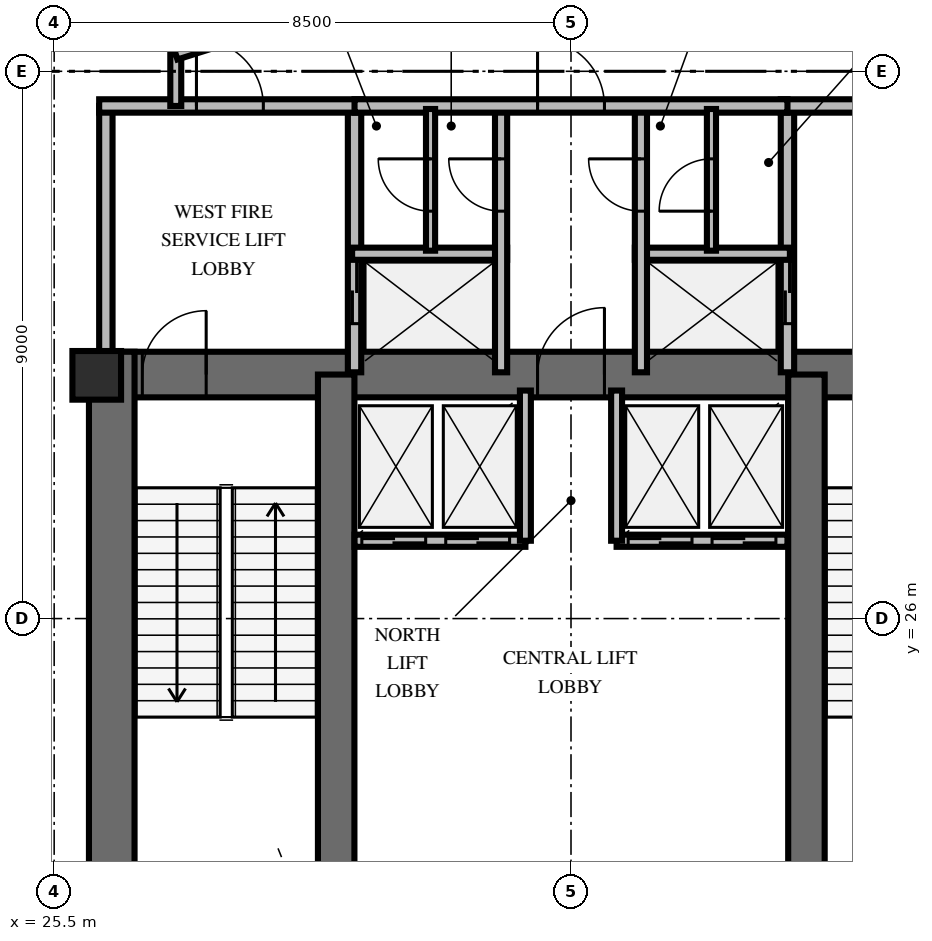
"""IFC4 building model, lengths in metres.
Left out: names, types, materials, properties, quantities, classifications, styles, units other than length and angle.
Written with IfcOpenShell. Run it as: python <this file> out.ifc"""

import sys

from ifc_helpers import new_model, si_unit, direction, frame, frame_2d, origin, origin_2d, place, context, subcontext, project, spatial, rectangle, extrude, element, fill, save


model = new_model("IFC4")
c1 = context("Model", 3, precision=1e-05, world=origin(), true_north=direction((0.0, 1.0)))
c2 = subcontext(c1, "Body", "Model", "MODEL_VIEW")
j1 = project(units=[si_unit("LENGTHUNIT", "METRE"), si_unit("PLANEANGLEUNIT", "RADIAN")], contexts=[c1])
p1 = place(None, origin())
s1 = spatial("IfcSite", under=j1, at=p1, CompositionType="ELEMENT")
p2 = place(p1, origin())
s2 = spatial("IfcBuilding", under=s1, at=p2, CompositionType="ELEMENT")
p3 = place(p2, frame((0.0, 0.0, 225.4)))
s3 = spatial("IfcBuildingStorey", under=s2, at=p3, CompositionType="ELEMENT", Elevation=225.4)
p4 = place(p3, frame((26.072, 30.013, 0.0), z_axis=(0.0, 0.0, 1.0), x_axis=(1.0, 0.0, 0.0)))
e1 = element("IfcWall", 1, at=p4, inside=s3, PredefinedType="SHEAR", context=c2, shape_type="SweptSolid", body=[
    extrude(rectangle(XDim=15.866, YDim=0.75, at=frame_2d((7.933, 0.0))), origin(), (0.0, 0.0, 1.0), 5.0),
])
p5 = place(p4, frame((0.878, 0.0, 0.0)))
e2 = element("IfcOpeningElement", 2, at=p5, cuts=e1, PredefinedType="OPENING", context=c2, shape_type="SweptSolid", body=[
    extrude(rectangle(XDim=1.05, YDim=2.15, at=frame_2d((0.525, 1.075))), frame((0.0, 0.385, 0.0), z_axis=(0.0, -1.0, 0.0), x_axis=(1.0, 0.0, 0.0)), (0.0, 0.0, 1.0), 0.77),
])
p6 = place(p4, frame((13.928, 0.0, 0.0)))
e3 = element("IfcOpeningElement", 3, at=p6, cuts=e1, PredefinedType="OPENING", context=c2, shape_type="SweptSolid", body=[
    extrude(rectangle(XDim=1.05, YDim=2.15, at=frame_2d((0.525, 1.075))), frame((0.0, 0.385, 0.0), z_axis=(0.0, -1.0, 0.0), x_axis=(1.0, 0.0, 0.0)), (0.0, 0.0, 1.0), 0.77),
])
p7 = place(p4, frame((7.378, 0.0, 0.0)))
e4 = element("IfcOpeningElement", 4, at=p7, cuts=e1, PredefinedType="OPENING", context=c2, shape_type="SweptSolid", body=[
    extrude(rectangle(XDim=1.1, YDim=2.15, at=frame_2d((0.55, 1.075))), frame((0.0, 0.385, 0.0), z_axis=(0.0, -1.0, 0.0), x_axis=(1.0, 0.0, 0.0)), (0.0, 0.0, 1.0), 0.77),
])
p8 = place(p3, frame((26.447, 19.812, 0.0), z_axis=(0.0, 0.0, 1.0), x_axis=(0.0, 1.0, 0.0)))
e5 = element("IfcWall", 5, at=p8, inside=s3, PredefinedType="SHEAR", context=c2, shape_type="SweptSolid", body=[
    extrude(rectangle(XDim=10.576, YDim=0.75, at=frame_2d((5.288, 0.0))), origin(), (0.0, 0.0, 1.0), 5.0),
])
for number, where, z_axis, x_axis in (
    (6, (30.138, 20.187, 0.0), (0.0, 0.0, 1.0), (0.0, 1.0, 0.0)),
    (7, (37.872, 20.187, 0.0), (0.0, 0.0, 1.0), (0.0, 1.0, 0.0)),
):
    element("IfcWall", number, at=place(p3, frame(where, z_axis=z_axis, x_axis=x_axis)), inside=s3, PredefinedType="SHEAR", context=c2, shape_type="SweptSolid", body=[
        extrude(rectangle(XDim=9.826, YDim=0.6, at=frame_2d((4.913, 0.0))), origin(), (0.0, 0.0, 1.0), 5.0),
    ])
p9 = place(p3, frame((26.2, 30.0, 0.0), z_axis=(0.0, 0.0, 1.0), x_axis=(1.0, 0.0, 0.0)))
e8 = element("IfcColumn", 8, at=p9, inside=s3, PredefinedType="PILASTER", context=c2, shape_type="SweptSolid", body=[
    extrude(rectangle(XDim=0.8, YDim=0.8, at=origin_2d()), origin(), (0.0, 0.0, 1.0), 5.0),
])
p10 = place(p3, frame((26.35, 30.05, 0.0), z_axis=(0.0, 0.0, 1.0), x_axis=(0.0, 1.0, 0.0)))
e9 = element("IfcWall", 9, at=p10, inside=s3, PredefinedType="SOLIDWALL", context=c2, shape_type="SweptSolid", body=[
    extrude(rectangle(XDim=4.38, YDim=0.22, at=frame_2d((2.19, 0.0))), origin(), (0.0, 0.0, 1.0), 2.9),
])
p11 = place(p3, frame((30.44, 30.05, 0.0), z_axis=(0.0, 0.0, 1.0), x_axis=(0.0, 1.0, 0.0)))
e10 = element("IfcWall", 10, at=p11, inside=s3, PredefinedType="SOLIDWALL", context=c2, shape_type="SweptSolid", body=[
    extrude(rectangle(XDim=4.38, YDim=0.22, at=frame_2d((2.19, 0.0))), origin(), (0.0, 0.0, 1.0), 2.9),
])
p12 = place(p11, frame((0.8, 0.0, 0.0)))
e11 = element("IfcOpeningElement", 11, at=p12, cuts=e10, PredefinedType="OPENING", context=c2, shape_type="SweptSolid", body=[
    extrude(rectangle(XDim=1.05, YDim=2.1, at=frame_2d((0.525, 1.05))), frame((0.0, 0.12, 0.0), z_axis=(0.0, -1.0, 0.0), x_axis=(1.0, 0.0, 0.0)), (0.0, 0.0, 1.0), 0.24),
])
p13 = place(p3, frame((26.24, 34.43, 0.0), z_axis=(0.0, 0.0, 1.0), x_axis=(1.0, 0.0, 0.0)))
e12 = element("IfcWall", 12, at=p13, inside=s3, PredefinedType="SOLIDWALL", context=c2, shape_type="SweptSolid", body=[
    extrude(rectangle(XDim=4.31, YDim=0.22, at=frame_2d((2.155, 0.0))), origin(), (0.0, 0.0, 1.0), 2.9),
])
p14 = place(p13, frame((1.6, 0.0, 0.0)))
e13 = element("IfcOpeningElement", 13, at=p14, cuts=e12, PredefinedType="OPENING", context=c2, shape_type="SweptSolid", body=[
    extrude(rectangle(XDim=1.1, YDim=2.15, at=frame_2d((0.55, 1.075))), frame((0.0, 0.12, 0.0), z_axis=(0.0, -1.0, 0.0), x_axis=(1.0, 0.0, 0.0)), (0.0, 0.0, 1.0), 0.24),
])
p15 = place(p3, frame((30.4, 32.0, 0.0), z_axis=(0.0, 0.0, 1.0), x_axis=(1.0, 0.0, 0.0)))
e14 = element("IfcWall", 14, at=p15, inside=s3, PredefinedType="SOLIDWALL", context=c2, shape_type="SweptSolid", body=[
    extrude(rectangle(XDim=2.55, YDim=0.2, at=frame_2d((1.275, 0.0))), origin(), (0.0, 0.0, 1.0), 2.9),
])
p16 = place(p3, frame((32.85, 30.05, 0.0), z_axis=(0.0, 0.0, 1.0), x_axis=(0.0, 1.0, 0.0)))
e15 = element("IfcWall", 15, at=p16, inside=s3, PredefinedType="SOLIDWALL", context=c2, shape_type="SweptSolid", body=[
    extrude(rectangle(XDim=4.38, YDim=0.2, at=frame_2d((2.19, 0.0))), origin(), (0.0, 0.0, 1.0), 2.9),
])
p17 = place(p16, frame((2.65, 0.0, 0.0)))
e16 = element("IfcOpeningElement", 16, at=p17, cuts=e15, PredefinedType="OPENING", context=c2, shape_type="SweptSolid", body=[
    extrude(rectangle(XDim=0.86, YDim=2.05, at=frame_2d((0.43, 1.025))), frame((0.0, 0.11, 0.0), z_axis=(0.0, -1.0, 0.0), x_axis=(1.0, 0.0, 0.0)), (0.0, 0.0, 1.0), 0.22),
])
p18 = place(p3, frame((37.56, 30.05, 0.0), z_axis=(0.0, 0.0, 1.0), x_axis=(0.0, 1.0, 0.0)))
e17 = element("IfcWall", 17, at=p18, inside=s3, PredefinedType="SOLIDWALL", context=c2, shape_type="SweptSolid", body=[
    extrude(rectangle(XDim=4.38, YDim=0.22, at=frame_2d((2.19, 0.0))), origin(), (0.0, 0.0, 1.0), 2.9),
])
p19 = place(p18, frame((0.8, 0.0, 0.0)))
e18 = element("IfcOpeningElement", 18, at=p19, cuts=e17, PredefinedType="OPENING", context=c2, shape_type="SweptSolid", body=[
    extrude(rectangle(XDim=1.05, YDim=2.1, at=frame_2d((0.525, 1.05))), frame((0.0, 0.12, 0.0), z_axis=(0.0, -1.0, 0.0), x_axis=(1.0, 0.0, 0.0)), (0.0, 0.0, 1.0), 0.24),
])
p20 = place(p3, frame((37.45, 34.43, 0.0), z_axis=(0.0, 0.0, 1.0), x_axis=(1.0, 0.0, 0.0)))
e19 = element("IfcWall", 19, at=p20, inside=s3, PredefinedType="SOLIDWALL", context=c2, shape_type="SweptSolid", body=[
    extrude(rectangle(XDim=4.31, YDim=0.22, at=frame_2d((2.155, 0.0))), origin(), (0.0, 0.0, 1.0), 2.9),
])
p21 = place(p20, frame((1.6, 0.0, 0.0)))
e20 = element("IfcOpeningElement", 20, at=p21, cuts=e19, PredefinedType="OPENING", context=c2, shape_type="SweptSolid", body=[
    extrude(rectangle(XDim=1.1, YDim=2.15, at=frame_2d((0.55, 1.075))), frame((0.0, 0.12, 0.0), z_axis=(0.0, -1.0, 0.0), x_axis=(1.0, 0.0, 0.0)), (0.0, 0.0, 1.0), 0.24),
])
p22 = place(p3, frame((35.05, 32.0, 0.0), z_axis=(0.0, 0.0, 1.0), x_axis=(1.0, 0.0, 0.0)))
e21 = element("IfcWall", 21, at=p22, inside=s3, PredefinedType="SOLIDWALL", context=c2, shape_type="SweptSolid", body=[
    extrude(rectangle(XDim=2.55, YDim=0.2, at=frame_2d((1.275, 0.0))), origin(), (0.0, 0.0, 1.0), 2.9),
])
p23 = place(p3, frame((35.15, 30.05, 0.0), z_axis=(0.0, 0.0, 1.0), x_axis=(0.0, 1.0, 0.0)))
e22 = element("IfcWall", 22, at=p23, inside=s3, PredefinedType="SOLIDWALL", context=c2, shape_type="SweptSolid", body=[
    extrude(rectangle(XDim=4.38, YDim=0.2, at=frame_2d((2.19, 0.0))), origin(), (0.0, 0.0, 1.0), 2.9),
])
p24 = place(p23, frame((2.65, 0.0, 0.0)))
e23 = element("IfcOpeningElement", 23, at=p24, cuts=e22, PredefinedType="OPENING", context=c2, shape_type="SweptSolid", body=[
    extrude(rectangle(XDim=0.86, YDim=2.05, at=frame_2d((0.43, 1.025))), frame((0.0, 0.11, 0.0), z_axis=(0.0, -1.0, 0.0), x_axis=(1.0, 0.0, 0.0)), (0.0, 0.0, 1.0), 0.22),
])
p25 = place(p3, frame((30.44, 34.43, 0.0), z_axis=(0.0, 0.0, 1.0), x_axis=(1.0, 0.0, 0.0)))
e24 = element("IfcWall", 24, at=p25, inside=s3, PredefinedType="SOLIDWALL", context=c2, shape_type="SweptSolid", body=[
    extrude(rectangle(XDim=7.12, YDim=0.22, at=frame_2d((3.56, 0.0))), origin(), (0.0, 0.0, 1.0), 2.9),
])
p26 = place(p25, frame((3.01, 0.0, 0.0)))
e25 = element("IfcOpeningElement", 25, at=p26, cuts=e24, PredefinedType="OPENING", context=c2, shape_type="SweptSolid", body=[
    extrude(rectangle(XDim=1.1, YDim=2.15, at=frame_2d((0.55, 1.075))), frame((0.0, 0.12, 0.0), z_axis=(0.0, -1.0, 0.0), x_axis=(1.0, 0.0, 0.0)), (0.0, 0.0, 1.0), 0.24),
])
p27 = place(p3, frame((31.69, 32.05, 0.0), z_axis=(0.0, 0.0, 1.0), x_axis=(0.0, 1.0, 0.0)))
e26 = element("IfcWall", 26, at=p27, inside=s3, PredefinedType="PARTITIONING", context=c2, shape_type="SweptSolid", body=[
    extrude(rectangle(XDim=2.33, YDim=0.15, at=frame_2d((1.165, 0.0))), origin(), (0.0, 0.0, 1.0), 2.9),
])
p28 = place(p27, frame((0.65, 0.0, 0.0)))
e27 = element("IfcOpeningElement", 27, at=p28, cuts=e26, PredefinedType="OPENING", context=c2, shape_type="SweptSolid", body=[
    extrude(rectangle(XDim=0.86, YDim=2.05, at=frame_2d((0.43, 1.025))), frame((0.0, 0.085, 0.0), z_axis=(0.0, -1.0, 0.0), x_axis=(1.0, 0.0, 0.0)), (0.0, 0.0, 1.0), 0.17),
])
p29 = place(p3, frame((36.31, 32.05, 0.0), z_axis=(0.0, 0.0, 1.0), x_axis=(0.0, 1.0, 0.0)))
e28 = element("IfcWall", 28, at=p29, inside=s3, PredefinedType="PARTITIONING", context=c2, shape_type="SweptSolid", body=[
    extrude(rectangle(XDim=2.33, YDim=0.15, at=frame_2d((1.165, 0.0))), origin(), (0.0, 0.0, 1.0), 2.9),
])
p30 = place(p29, frame((0.65, 0.0, 0.0)))
e29 = element("IfcOpeningElement", 29, at=p30, cuts=e28, PredefinedType="OPENING", context=c2, shape_type="SweptSolid", body=[
    extrude(rectangle(XDim=0.86, YDim=2.05, at=frame_2d((0.43, 1.025))), frame((0.0, 0.085, 0.0), z_axis=(0.0, -1.0, 0.0), x_axis=(1.0, 0.0, 0.0)), (0.0, 0.0, 1.0), 0.17),
])
p31 = place(p3, frame((30.44, 27.28, 0.0), z_axis=(0.0, 0.0, 1.0), x_axis=(1.0, 0.0, 0.0)))
e30 = element("IfcWall", 30, at=p31, inside=s3, PredefinedType="SOLIDWALL", context=c2, shape_type="SweptSolid", body=[
    extrude(rectangle(XDim=2.81, YDim=0.2, at=frame_2d((1.405, 0.0))), origin(), (0.0, 0.0, 1.0), 2.9),
])
p32 = place(p31, frame((0.12, 0.0, 0.0)))
e31 = element("IfcOpeningElement", 31, at=p32, cuts=e30, PredefinedType="OPENING", context=c2, shape_type="SweptSolid", body=[
    extrude(rectangle(XDim=1.05, YDim=2.1, at=frame_2d((0.525, 1.05))), frame((0.0, 0.11, 0.0), z_axis=(0.0, -1.0, 0.0), x_axis=(1.0, 0.0, 0.0)), (0.0, 0.0, 1.0), 0.22),
])
p33 = place(p31, frame((1.5, 0.0, 0.0)))
e32 = element("IfcOpeningElement", 32, at=p33, cuts=e30, PredefinedType="OPENING", context=c2, shape_type="SweptSolid", body=[
    extrude(rectangle(XDim=1.05, YDim=2.1, at=frame_2d((0.525, 1.05))), frame((0.0, 0.11, 0.0), z_axis=(0.0, -1.0, 0.0), x_axis=(1.0, 0.0, 0.0)), (0.0, 0.0, 1.0), 0.22),
])
p34 = place(p3, frame((33.25, 27.28, 0.0), z_axis=(0.0, 0.0, 1.0), x_axis=(0.0, 1.0, 0.0)))
e33 = element("IfcWall", 33, at=p34, inside=s3, PredefinedType="SOLIDWALL", context=c2, shape_type="SweptSolid", body=[
    extrude(rectangle(XDim=2.47, YDim=0.18, at=frame_2d((1.235, 0.0))), origin(), (0.0, 0.0, 1.0), 2.9),
])
p35 = place(p3, frame((34.75, 27.28, 0.0), z_axis=(0.0, 0.0, 1.0), x_axis=(1.0, 0.0, 0.0)))
e34 = element("IfcWall", 34, at=p35, inside=s3, PredefinedType="SOLIDWALL", context=c2, shape_type="SweptSolid", body=[
    extrude(rectangle(XDim=2.81, YDim=0.2, at=frame_2d((1.405, 0.0))), origin(), (0.0, 0.0, 1.0), 2.9),
])
p36 = place(p35, frame((0.19, 0.0, 0.0)))
e35 = element("IfcOpeningElement", 35, at=p36, cuts=e34, PredefinedType="OPENING", context=c2, shape_type="SweptSolid", body=[
    extrude(rectangle(XDim=1.05, YDim=2.1, at=frame_2d((0.525, 1.05))), frame((0.0, 0.11, 0.0), z_axis=(0.0, -1.0, 0.0), x_axis=(1.0, 0.0, 0.0)), (0.0, 0.0, 1.0), 0.22),
])
p37 = place(p35, frame((1.57, 0.0, 0.0)))
e36 = element("IfcOpeningElement", 36, at=p37, cuts=e34, PredefinedType="OPENING", context=c2, shape_type="SweptSolid", body=[
    extrude(rectangle(XDim=1.05, YDim=2.1, at=frame_2d((0.525, 1.05))), frame((0.0, 0.11, 0.0), z_axis=(0.0, -1.0, 0.0), x_axis=(1.0, 0.0, 0.0)), (0.0, 0.0, 1.0), 0.22),
])
p38 = place(p3, frame((34.75, 27.28, 0.0), z_axis=(0.0, 0.0, 1.0), x_axis=(0.0, 1.0, 0.0)))
e37 = element("IfcWall", 37, at=p38, inside=s3, PredefinedType="SOLIDWALL", context=c2, shape_type="SweptSolid", body=[
    extrude(rectangle(XDim=2.47, YDim=0.18, at=frame_2d((1.235, 0.0))), origin(), (0.0, 0.0, 1.0), 2.9),
])
p39 = place(p3, frame((27.5, 34.43, 0.0), z_axis=(0.0, 0.0, 1.0), x_axis=(0.0, 1.0, 0.0)))
e38 = element("IfcWall", 38, at=p39, inside=s3, PredefinedType="PARTITIONING", context=c2, shape_type="SweptSolid", body=[
    extrude(rectangle(XDim=0.85, YDim=0.18, at=frame_2d((0.425, 0.0))), origin(), (0.0, 0.0, 1.0), 2.9),
])
p40 = place(p3, frame((27.5, 35.28, 0.0), z_axis=(0.0, 0.0, 1.0), x_axis=(0.953691418528, 0.300786765376, 0.0)))
e39 = element("IfcWall", 39, at=p40, inside=s3, PredefinedType="PARTITIONING", context=c2, shape_type="SweptSolid", body=[
    extrude(rectangle(XDim=6.816, YDim=0.18, at=frame_2d((3.408, 0.0))), origin(), (0.0, 0.0, 1.0), 2.9),
])
p41 = place(p40, frame((2.858, 0.0, 0.0)))
e40 = element("IfcOpeningElement", 40, at=p41, cuts=e39, PredefinedType="OPENING", context=c2, shape_type="SweptSolid", body=[
    extrude(rectangle(XDim=1.1, YDim=2.15, at=frame_2d((0.55, 1.075))), frame((0.0, 0.1, 0.0), z_axis=(0.0, -1.0, 0.0), x_axis=(1.0, 0.0, 0.0)), (0.0, 0.0, 1.0), 0.2),
])
p42 = place(p3, frame((34.0, 37.33, 0.0), z_axis=(0.0, 0.0, 1.0), x_axis=(0.953691418528, -0.300786765376, 0.0)))
e41 = element("IfcWall", 41, at=p42, inside=s3, PredefinedType="PARTITIONING", context=c2, shape_type="SweptSolid", body=[
    extrude(rectangle(XDim=6.816, YDim=0.18, at=frame_2d((3.408, 0.0))), origin(), (0.0, 0.0, 1.0), 2.9),
])
p43 = place(p42, frame((2.858, 0.0, 0.0)))
e42 = element("IfcOpeningElement", 42, at=p43, cuts=e41, PredefinedType="OPENING", context=c2, shape_type="SweptSolid", body=[
    extrude(rectangle(XDim=1.1, YDim=2.15, at=frame_2d((0.55, 1.075))), frame((0.0, 0.1, 0.0), z_axis=(0.0, -1.0, 0.0), x_axis=(1.0, 0.0, 0.0)), (0.0, 0.0, 1.0), 0.2),
])
p44 = place(p3, frame((24.261, 34.566, 0.0), z_axis=(0.0, 0.0, 1.0), x_axis=(0.707106781187, 0.707106781187, 0.0)))
e43 = element("IfcWall", 43, at=p44, inside=s3, PredefinedType="SOLIDWALL", context=c2, shape_type="SweptSolid", body=[
    extrude(rectangle(XDim=1.659, YDim=0.2, at=frame_2d((0.83, 0.0))), origin(), (0.0, 0.0, 1.0), 2.9),
])
p45 = place(p44, frame((0.304, 0.0, 0.0)))
e44 = element("IfcOpeningElement", 44, at=p45, cuts=e43, PredefinedType="OPENING", context=c2, shape_type="SweptSolid", body=[
    extrude(rectangle(XDim=1.05, YDim=2.15, at=frame_2d((0.525, 1.075))), frame((0.0, 0.11, 0.0), z_axis=(0.0, -1.0, 0.0), x_axis=(1.0, 0.0, 0.0)), (0.0, 0.0, 1.0), 0.22),
])
p46 = place(p5, origin())
e45 = element("IfcDoor", 45, at=p46, inside=s3, OperationType="SINGLE_SWING_RIGHT", PredefinedType="DOOR", context=c2, shape_type="SweptSolid", body=[
    extrude(rectangle(XDim=1.05, YDim=2.15, at=frame_2d((0.525, 1.075))), frame((0.0, 0.025, 0.0), z_axis=(0.0, -1.0, 0.0), x_axis=(1.0, 0.0, 0.0)), (0.0, 0.0, 1.0), 0.05),
])
fill(e2, e45)
p47 = place(p7, origin())
e46 = element("IfcDoor", 46, at=p47, inside=s3, OperationType="SINGLE_SWING_RIGHT", PredefinedType="DOOR", context=c2, shape_type="SweptSolid", body=[
    extrude(rectangle(XDim=1.1, YDim=2.15, at=frame_2d((0.55, 1.075))), frame((0.0, 0.025, 0.0), z_axis=(0.0, -1.0, 0.0), x_axis=(1.0, 0.0, 0.0)), (0.0, 0.0, 1.0), 0.05),
])
fill(e4, e46)
p48 = place(p14, origin())
e47 = element("IfcDoor", 47, at=p48, inside=s3, OperationType="SINGLE_SWING_LEFT", PredefinedType="DOOR", context=c2, shape_type="SweptSolid", body=[
    extrude(rectangle(XDim=1.1, YDim=2.15, at=frame_2d((0.55, 1.075))), frame((0.0, 0.025, 0.0), z_axis=(0.0, -1.0, 0.0), x_axis=(1.0, 0.0, 0.0)), (0.0, 0.0, 1.0), 0.05),
])
fill(e13, e47)
p49 = place(p12, origin())
e48 = element("IfcDoor", 48, at=p49, inside=s3, OperationType="DOUBLE_DOOR_SLIDING", PredefinedType="USERDEFINED", context=c2, shape_type="SweptSolid", body=[
    extrude(rectangle(XDim=1.05, YDim=2.1, at=frame_2d((0.525, 1.05))), frame((0.0, 0.025, 0.0), z_axis=(0.0, -1.0, 0.0), x_axis=(1.0, 0.0, 0.0)), (0.0, 0.0, 1.0), 0.05),
])
fill(e11, e48)
p50 = place(p17, origin())
e49 = element("IfcDoor", 49, at=p50, inside=s3, OperationType="SINGLE_SWING_RIGHT", PredefinedType="TRAPDOOR", context=c2, shape_type="SweptSolid", body=[
    extrude(rectangle(XDim=0.86, YDim=2.05, at=frame_2d((0.43, 1.025))), frame((0.0, 0.025, 0.0), z_axis=(0.0, -1.0, 0.0), x_axis=(1.0, 0.0, 0.0)), (0.0, 0.0, 1.0), 0.05),
])
fill(e16, e49)
p51 = place(p19, origin())
e50 = element("IfcDoor", 50, at=p51, inside=s3, OperationType="DOUBLE_DOOR_SLIDING", PredefinedType="USERDEFINED", context=c2, shape_type="SweptSolid", body=[
    extrude(rectangle(XDim=1.05, YDim=2.1, at=frame_2d((0.525, 1.05))), frame((0.0, 0.025, 0.0), z_axis=(0.0, -1.0, 0.0), x_axis=(1.0, 0.0, 0.0)), (0.0, 0.0, 1.0), 0.05),
])
fill(e18, e50)
p52 = place(p24, origin())
e51 = element("IfcDoor", 51, at=p52, inside=s3, OperationType="SINGLE_SWING_RIGHT", PredefinedType="TRAPDOOR", context=c2, shape_type="SweptSolid", body=[
    extrude(rectangle(XDim=0.86, YDim=2.05, at=frame_2d((0.43, 1.025))), frame((0.0, 0.025, 0.0), z_axis=(0.0, -1.0, 0.0), x_axis=(1.0, 0.0, 0.0)), (0.0, 0.0, 1.0), 0.05),
])
fill(e23, e51)
p53 = place(p26, origin())
e52 = element("IfcDoor", 52, at=p53, inside=s3, OperationType="SINGLE_SWING_LEFT", PredefinedType="DOOR", context=c2, shape_type="SweptSolid", body=[
    extrude(rectangle(XDim=1.1, YDim=2.15, at=frame_2d((0.55, 1.075))), frame((0.0, 0.025, 0.0), z_axis=(0.0, -1.0, 0.0), x_axis=(1.0, 0.0, 0.0)), (0.0, 0.0, 1.0), 0.05),
])
fill(e25, e52)
p54 = place(p28, origin())
e53 = element("IfcDoor", 53, at=p54, inside=s3, OperationType="SINGLE_SWING_RIGHT", PredefinedType="TRAPDOOR", context=c2, shape_type="SweptSolid", body=[
    extrude(rectangle(XDim=0.86, YDim=2.05, at=frame_2d((0.43, 1.025))), frame((0.0, 0.025, 0.0), z_axis=(0.0, -1.0, 0.0), x_axis=(1.0, 0.0, 0.0)), (0.0, 0.0, 1.0), 0.05),
])
fill(e27, e53)
p55 = place(p30, origin())
e54 = element("IfcDoor", 54, at=p55, inside=s3, OperationType="SINGLE_SWING_LEFT", PredefinedType="TRAPDOOR", context=c2, shape_type="SweptSolid", body=[
    extrude(rectangle(XDim=0.86, YDim=2.05, at=frame_2d((0.43, 1.025))), frame((0.0, 0.025, 0.0), z_axis=(0.0, -1.0, 0.0), x_axis=(1.0, 0.0, 0.0)), (0.0, 0.0, 1.0), 0.05),
])
fill(e29, e54)
p56 = place(p32, origin())
e55 = element("IfcDoor", 55, at=p56, inside=s3, OperationType="DOUBLE_DOOR_SLIDING", PredefinedType="USERDEFINED", context=c2, shape_type="SweptSolid", body=[
    extrude(rectangle(XDim=1.05, YDim=2.1, at=frame_2d((0.525, 1.05))), frame((0.0, 0.025, 0.0), z_axis=(0.0, -1.0, 0.0), x_axis=(1.0, 0.0, 0.0)), (0.0, 0.0, 1.0), 0.05),
])
fill(e31, e55)
p57 = place(p33, origin())
e56 = element("IfcDoor", 56, at=p57, inside=s3, OperationType="DOUBLE_DOOR_SLIDING", PredefinedType="USERDEFINED", context=c2, shape_type="SweptSolid", body=[
    extrude(rectangle(XDim=1.05, YDim=2.1, at=frame_2d((0.525, 1.05))), frame((0.0, 0.025, 0.0), z_axis=(0.0, -1.0, 0.0), x_axis=(1.0, 0.0, 0.0)), (0.0, 0.0, 1.0), 0.05),
])
fill(e32, e56)
p58 = place(p36, origin())
e57 = element("IfcDoor", 57, at=p58, inside=s3, OperationType="DOUBLE_DOOR_SLIDING", PredefinedType="USERDEFINED", context=c2, shape_type="SweptSolid", body=[
    extrude(rectangle(XDim=1.05, YDim=2.1, at=frame_2d((0.525, 1.05))), frame((0.0, 0.025, 0.0), z_axis=(0.0, -1.0, 0.0), x_axis=(1.0, 0.0, 0.0)), (0.0, 0.0, 1.0), 0.05),
])
fill(e35, e57)
p59 = place(p37, origin())
e58 = element("IfcDoor", 58, at=p59, inside=s3, OperationType="DOUBLE_DOOR_SLIDING", PredefinedType="USERDEFINED", context=c2, shape_type="SweptSolid", body=[
    extrude(rectangle(XDim=1.05, YDim=2.1, at=frame_2d((0.525, 1.05))), frame((0.0, 0.025, 0.0), z_axis=(0.0, -1.0, 0.0), x_axis=(1.0, 0.0, 0.0)), (0.0, 0.0, 1.0), 0.05),
])
fill(e36, e58)
save(model, sys.argv[1])
